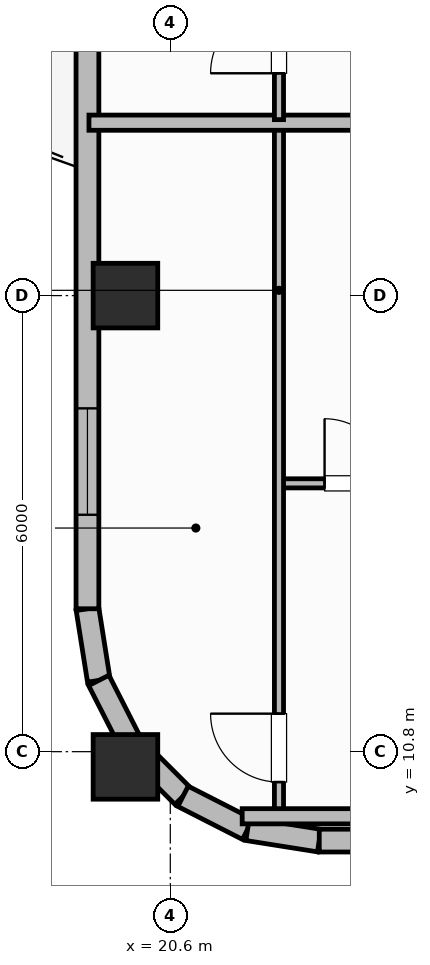
"""IFC4 building model, lengths in metres.
Left out: names, types, materials, properties, quantities, classifications, styles, units other than length and angle.
Written with IfcOpenShell. Run it as: python <this file> out.ifc"""

import sys

from ifc_helpers import new_model, si_unit, direction, frame, frame_2d, origin, origin_2d, place, context, subcontext, project, spatial, rectangle, extrude, element, fill, save


model = new_model("IFC4")
c1 = context("Model", 3, precision=1e-05, world=origin(), true_north=direction((0.0, 1.0)))
c2 = subcontext(c1, "Body", "Model", "MODEL_VIEW")
j1 = project(units=[si_unit("LENGTHUNIT", "METRE"), si_unit("PLANEANGLEUNIT", "RADIAN")], contexts=[c1])
p1 = place(None, origin())
s1 = spatial("IfcSite", under=j1, at=p1, CompositionType="ELEMENT")
p2 = place(p1, origin())
s2 = spatial("IfcBuilding", under=s1, at=p2, CompositionType="ELEMENT")
p3 = place(p2, frame((0.0, 0.0, 229.5)))
s3 = spatial("IfcBuildingStorey", under=s2, at=p3, CompositionType="ELEMENT", Elevation=229.5)
for number, where, z_axis, x_axis in (
    (1, (20.01, 10.6, 0.0), (0.0, 0.0, 1.0), (1.0, 0.0, 0.0)),
    (2, (20.01, 16.8, 0.0), (0.0, 0.0, 1.0), (1.0, 0.0, 0.0)),
):
    element("IfcColumn", number, at=place(p3, frame(where, z_axis=z_axis, x_axis=x_axis)), inside=s3, PredefinedType="COLUMN", context=c2, shape_type="SweptSolid", body=[
        extrude(rectangle(XDim=0.85, YDim=0.85, at=origin_2d()), origin(), (0.0, 0.0, 1.0), 3.7),
    ])
p4 = place(p3, frame((19.51, 12.68, 0.0), z_axis=(0.0, 0.0, 1.0), x_axis=(0.156343617883, -0.987702725088, 0.0)))
e3 = element("IfcWall", 3, at=p4, inside=s3, PredefinedType="SOLIDWALL", context=c2, shape_type="SweptSolid", body=[
    extrude(rectangle(XDim=0.954, YDim=0.3, at=frame_2d((0.477, 0.0))), origin(), (0.0, 0.0, 1.0), 2.73),
])
for number, where, z_axis, x_axis in (
    (4, (19.659, 11.738, 0.0), (0.0, 0.0, 1.0), (0.454, -0.891, 0.0)),
    (5, (20.093, 10.887, 0.0), (0.0, 0.0, 1.0), (0.707, -0.707, 0.0)),
):
    element("IfcWall", number, at=place(p3, frame(where, z_axis=z_axis, x_axis=x_axis)), inside=s3, PredefinedType="SOLIDWALL", context=c2, shape_type="SweptSolid", body=[
        extrude(rectangle(XDim=0.954, YDim=0.3, at=frame_2d((0.477, 0.0))), origin(), (0.0, 0.0, 1.0), 2.73),
    ])
p5 = place(p3, frame((20.767, 10.212, 0.0), z_axis=(0.0, 0.0, 1.0), x_axis=(0.891023873617, -0.45395644796, 0.0)))
e6 = element("IfcWall", 6, at=p5, inside=s3, PredefinedType="SOLIDWALL", context=c2, shape_type="SweptSolid", body=[
    extrude(rectangle(XDim=0.954, YDim=0.3, at=frame_2d((0.477, 0.0))), origin(), (0.0, 0.0, 1.0), 2.73),
])
p6 = place(p3, frame((21.617, 9.779, 0.0), z_axis=(0.0, 0.0, 1.0), x_axis=(0.987669453596, -0.156553666304, 0.0)))
e7 = element("IfcWall", 7, at=p6, inside=s3, PredefinedType="SOLIDWALL", context=c2, shape_type="SweptSolid", body=[
    extrude(rectangle(XDim=0.954, YDim=0.3, at=frame_2d((0.477, 0.0))), origin(), (0.0, 0.0, 1.0), 2.73),
])
p7 = place(p3, frame((22.56, 9.63, 0.0), z_axis=(0.0, 0.0, 1.0), x_axis=(1.0, 0.0, 0.0)))
e8 = element("IfcWall", 8, at=p7, inside=s3, PredefinedType="SOLIDWALL", context=c2, shape_type="SweptSolid", body=[
    extrude(rectangle(XDim=33.28, YDim=0.3, at=frame_2d((16.64, 0.0))), origin(), (0.0, 0.0, 1.0), 2.73),
])
p8 = place(p7, frame((4.747, 0.0, 0.76)))
e9 = element("IfcOpeningElement", 9, at=p8, cuts=e8, PredefinedType="OPENING", context=c2, shape_type="SweptSolid", body=[
    extrude(rectangle(XDim=1.4, YDim=1.85, at=frame_2d((0.7, 0.925))), frame((0.0, 0.16, 0.0), z_axis=(0.0, -1.0, 0.0), x_axis=(1.0, 0.0, 0.0)), (0.0, 0.0, 1.0), 0.32),
])
p9 = place(p7, frame((7.945, 0.0, 0.76)))
e10 = element("IfcOpeningElement", 10, at=p9, cuts=e8, PredefinedType="OPENING", context=c2, shape_type="SweptSolid", body=[
    extrude(rectangle(XDim=1.4, YDim=1.85, at=frame_2d((0.7, 0.925))), frame((0.0, 0.16, 0.0), z_axis=(0.0, -1.0, 0.0), x_axis=(1.0, 0.0, 0.0)), (0.0, 0.0, 1.0), 0.32),
])
p10 = place(p7, frame((14.341, 0.0, 0.76)))
e11 = element("IfcOpeningElement", 11, at=p10, cuts=e8, PredefinedType="OPENING", context=c2, shape_type="SweptSolid", body=[
    extrude(rectangle(XDim=1.4, YDim=1.85, at=frame_2d((0.7, 0.925))), frame((0.0, 0.16, 0.0), z_axis=(0.0, -1.0, 0.0), x_axis=(1.0, 0.0, 0.0)), (0.0, 0.0, 1.0), 0.32),
])
p11 = place(p7, frame((17.539, 0.0, 0.76)))
e12 = element("IfcOpeningElement", 12, at=p11, cuts=e8, PredefinedType="OPENING", context=c2, shape_type="SweptSolid", body=[
    extrude(rectangle(XDim=1.4, YDim=1.85, at=frame_2d((0.7, 0.925))), frame((0.0, 0.16, 0.0), z_axis=(0.0, -1.0, 0.0), x_axis=(1.0, 0.0, 0.0)), (0.0, 0.0, 1.0), 0.32),
])
p12 = place(p7, frame((23.935, 0.0, 0.76)))
e13 = element("IfcOpeningElement", 13, at=p12, cuts=e8, PredefinedType="OPENING", context=c2, shape_type="SweptSolid", body=[
    extrude(rectangle(XDim=1.4, YDim=1.85, at=frame_2d((0.7, 0.925))), frame((0.0, 0.16, 0.0), z_axis=(0.0, -1.0, 0.0), x_axis=(1.0, 0.0, 0.0)), (0.0, 0.0, 1.0), 0.32),
])
p13 = place(p7, frame((27.133, 0.0, 0.76)))
e14 = element("IfcOpeningElement", 14, at=p13, cuts=e8, PredefinedType="OPENING", context=c2, shape_type="SweptSolid", body=[
    extrude(rectangle(XDim=1.4, YDim=1.85, at=frame_2d((0.7, 0.925))), frame((0.0, 0.16, 0.0), z_axis=(0.0, -1.0, 0.0), x_axis=(1.0, 0.0, 0.0)), (0.0, 0.0, 1.0), 0.32),
])
p14 = place(p3, frame((19.51, 23.8, 0.0), z_axis=(0.0, 0.0, 1.0), x_axis=(0.0, -1.0, 0.0)))
e15 = element("IfcWall", 15, at=p14, inside=s3, PredefinedType="SOLIDWALL", context=c2, shape_type="SweptSolid", body=[
    extrude(rectangle(XDim=11.12, YDim=0.3, at=frame_2d((5.56, 0.0))), origin(), (0.0, 0.0, 1.0), 2.73),
])
p15 = place(p14, frame((2.1, 0.0, 0.0)))
e16 = element("IfcOpeningElement", 16, at=p15, cuts=e15, PredefinedType="OPENING", context=c2, shape_type="SweptSolid", body=[
    extrude(rectangle(XDim=1.6, YDim=2.1, at=frame_2d((0.8, 1.05))), frame((0.0, 0.16, 0.0), z_axis=(0.0, -1.0, 0.0), x_axis=(1.0, 0.0, 0.0)), (0.0, 0.0, 1.0), 0.32),
])
p16 = place(p14, frame((8.483, 0.0, 0.76)))
e17 = element("IfcOpeningElement", 17, at=p16, cuts=e15, PredefinedType="OPENING", context=c2, shape_type="SweptSolid", body=[
    extrude(rectangle(XDim=1.4, YDim=1.85, at=frame_2d((0.7, 0.925))), frame((0.0, 0.16, 0.0), z_axis=(0.0, -1.0, 0.0), x_axis=(1.0, 0.0, 0.0)), (0.0, 0.0, 1.0), 0.32),
])
p17 = place(p3, frame((22.03, 14.33, 0.0), z_axis=(0.0, 0.0, 1.0), x_axis=(1.0, 0.0, 0.0)))
e18 = element("IfcWall", 18, at=p17, inside=s3, PredefinedType="PARTITIONING", context=c2, shape_type="SweptSolid", body=[
    extrude(rectangle(XDim=1.95, YDim=0.12, at=frame_2d((0.975, 0.0))), origin(), (0.0, 0.0, 1.0), 2.56),
])
p18 = place(p17, frame((0.6, 0.0, 0.0)))
e19 = element("IfcOpeningElement", 19, at=p18, cuts=e18, PredefinedType="OPENING", context=c2, shape_type="SweptSolid", body=[
    extrude(rectangle(XDim=0.85, YDim=2.1, at=frame_2d((0.425, 1.05))), frame((0.0, 0.07, 0.0), z_axis=(0.0, -1.0, 0.0), x_axis=(1.0, 0.0, 0.0)), (0.0, 0.0, 1.0), 0.14),
])
p19 = place(p3, frame((22.03, 9.99, 0.0), z_axis=(0.0, 0.0, 1.0), x_axis=(0.0, 1.0, 0.0)))
e20 = element("IfcWall", 20, at=p19, inside=s3, PredefinedType="PARTITIONING", context=c2, shape_type="SweptSolid", body=[
    extrude(rectangle(XDim=9.045, YDim=0.12, at=frame_2d((4.522, 0.0))), origin(), (0.0, 0.0, 1.0), 2.56),
])
p20 = place(p19, frame((0.41, 0.0, 0.0)))
e21 = element("IfcOpeningElement", 21, at=p20, cuts=e20, PredefinedType="OPENING", context=c2, shape_type="SweptSolid", body=[
    extrude(rectangle(XDim=0.9, YDim=2.1, at=frame_2d((0.45, 1.05))), frame((0.0, 0.07, 0.0), z_axis=(0.0, -1.0, 0.0), x_axis=(1.0, 0.0, 0.0)), (0.0, 0.0, 1.0), 0.14),
])
p21 = place(p3, frame((19.53, 19.075, 0.0), z_axis=(0.0, 0.0, 1.0), x_axis=(1.0, 0.0, 0.0)))
e22 = element("IfcWall", 22, at=p21, inside=s3, PredefinedType="PARTITIONING", context=c2, shape_type="SweptSolid", body=[
    extrude(rectangle(XDim=4.45, YDim=0.2, at=frame_2d((2.225, 0.0))), origin(), (0.0, 0.0, 1.0), 2.56),
])
p22 = place(p3, frame((22.03, 19.115, 0.0), z_axis=(0.0, 0.0, 1.0), x_axis=(0.0, 1.0, 0.0)))
e23 = element("IfcWall", 23, at=p22, inside=s3, PredefinedType="PARTITIONING", context=c2, shape_type="SweptSolid", body=[
    extrude(rectangle(XDim=5.42, YDim=0.12, at=frame_2d((2.71, 0.0))), origin(), (0.0, 0.0, 1.0), 2.56),
])
p23 = place(p22, frame((0.61, 0.0, 0.0)))
e24 = element("IfcOpeningElement", 24, at=p23, cuts=e23, PredefinedType="OPENING", context=c2, shape_type="SweptSolid", body=[
    extrude(rectangle(XDim=0.9, YDim=2.1, at=frame_2d((0.45, 1.05))), frame((0.0, 0.07, 0.0), z_axis=(0.0, -1.0, 0.0), x_axis=(1.0, 0.0, 0.0)), (0.0, 0.0, 1.0), 0.14),
])
p24 = place(p3, frame((21.546, 9.95, 0.0), z_axis=(0.0, 0.0, 1.0), x_axis=(1.0, 0.0, 0.0)))
e25 = element("IfcWall", 25, at=p24, inside=s3, PredefinedType="PARTITIONING", context=c2, shape_type="SweptSolid", body=[
    extrude(rectangle(XDim=3.754, YDim=0.2, at=frame_2d((1.877, 0.0))), origin(), (0.0, 0.0, 1.0), 2.56),
])
p25 = place(p16, origin())
e26 = element("IfcWindow", 26, at=p25, inside=s3, PartitioningType="SINGLE_PANEL", PredefinedType="WINDOW", context=c2, shape_type="SweptSolid", body=[
    extrude(rectangle(XDim=1.4, YDim=1.85, at=frame_2d((0.7, 0.925))), frame((0.0, 0.03, 0.0), z_axis=(0.0, -1.0, 0.0), x_axis=(1.0, 0.0, 0.0)), (0.0, 0.0, 1.0), 0.06),
])
fill(e17, e26)
p26 = place(p18, origin())
e27 = element("IfcDoor", 27, at=p26, inside=s3, OperationType="SINGLE_SWING_LEFT", PredefinedType="DOOR", context=c2, shape_type="SweptSolid", body=[
    extrude(rectangle(XDim=0.85, YDim=2.1, at=frame_2d((0.425, 1.05))), frame((0.0, 0.025, 0.0), z_axis=(0.0, -1.0, 0.0), x_axis=(1.0, 0.0, 0.0)), (0.0, 0.0, 1.0), 0.05),
])
fill(e19, e27)
p27 = place(p20, origin())
e28 = element("IfcDoor", 28, at=p27, inside=s3, OperationType="SINGLE_SWING_RIGHT", PredefinedType="DOOR", context=c2, shape_type="SweptSolid", body=[
    extrude(rectangle(XDim=0.9, YDim=2.1, at=frame_2d((0.45, 1.05))), frame((0.0, 0.025, 0.0), z_axis=(0.0, -1.0, 0.0), x_axis=(1.0, 0.0, 0.0)), (0.0, 0.0, 1.0), 0.05),
])
fill(e21, e28)
p28 = place(p23, origin())
e29 = element("IfcDoor", 29, at=p28, inside=s3, OperationType="SINGLE_SWING_LEFT", PredefinedType="DOOR", context=c2, shape_type="SweptSolid", body=[
    extrude(rectangle(XDim=0.9, YDim=2.1, at=frame_2d((0.45, 1.05))), frame((0.0, 0.025, 0.0), z_axis=(0.0, -1.0, 0.0), x_axis=(1.0, 0.0, 0.0)), (0.0, 0.0, 1.0), 0.05),
])
fill(e24, e29)
save(model, sys.argv[1])
